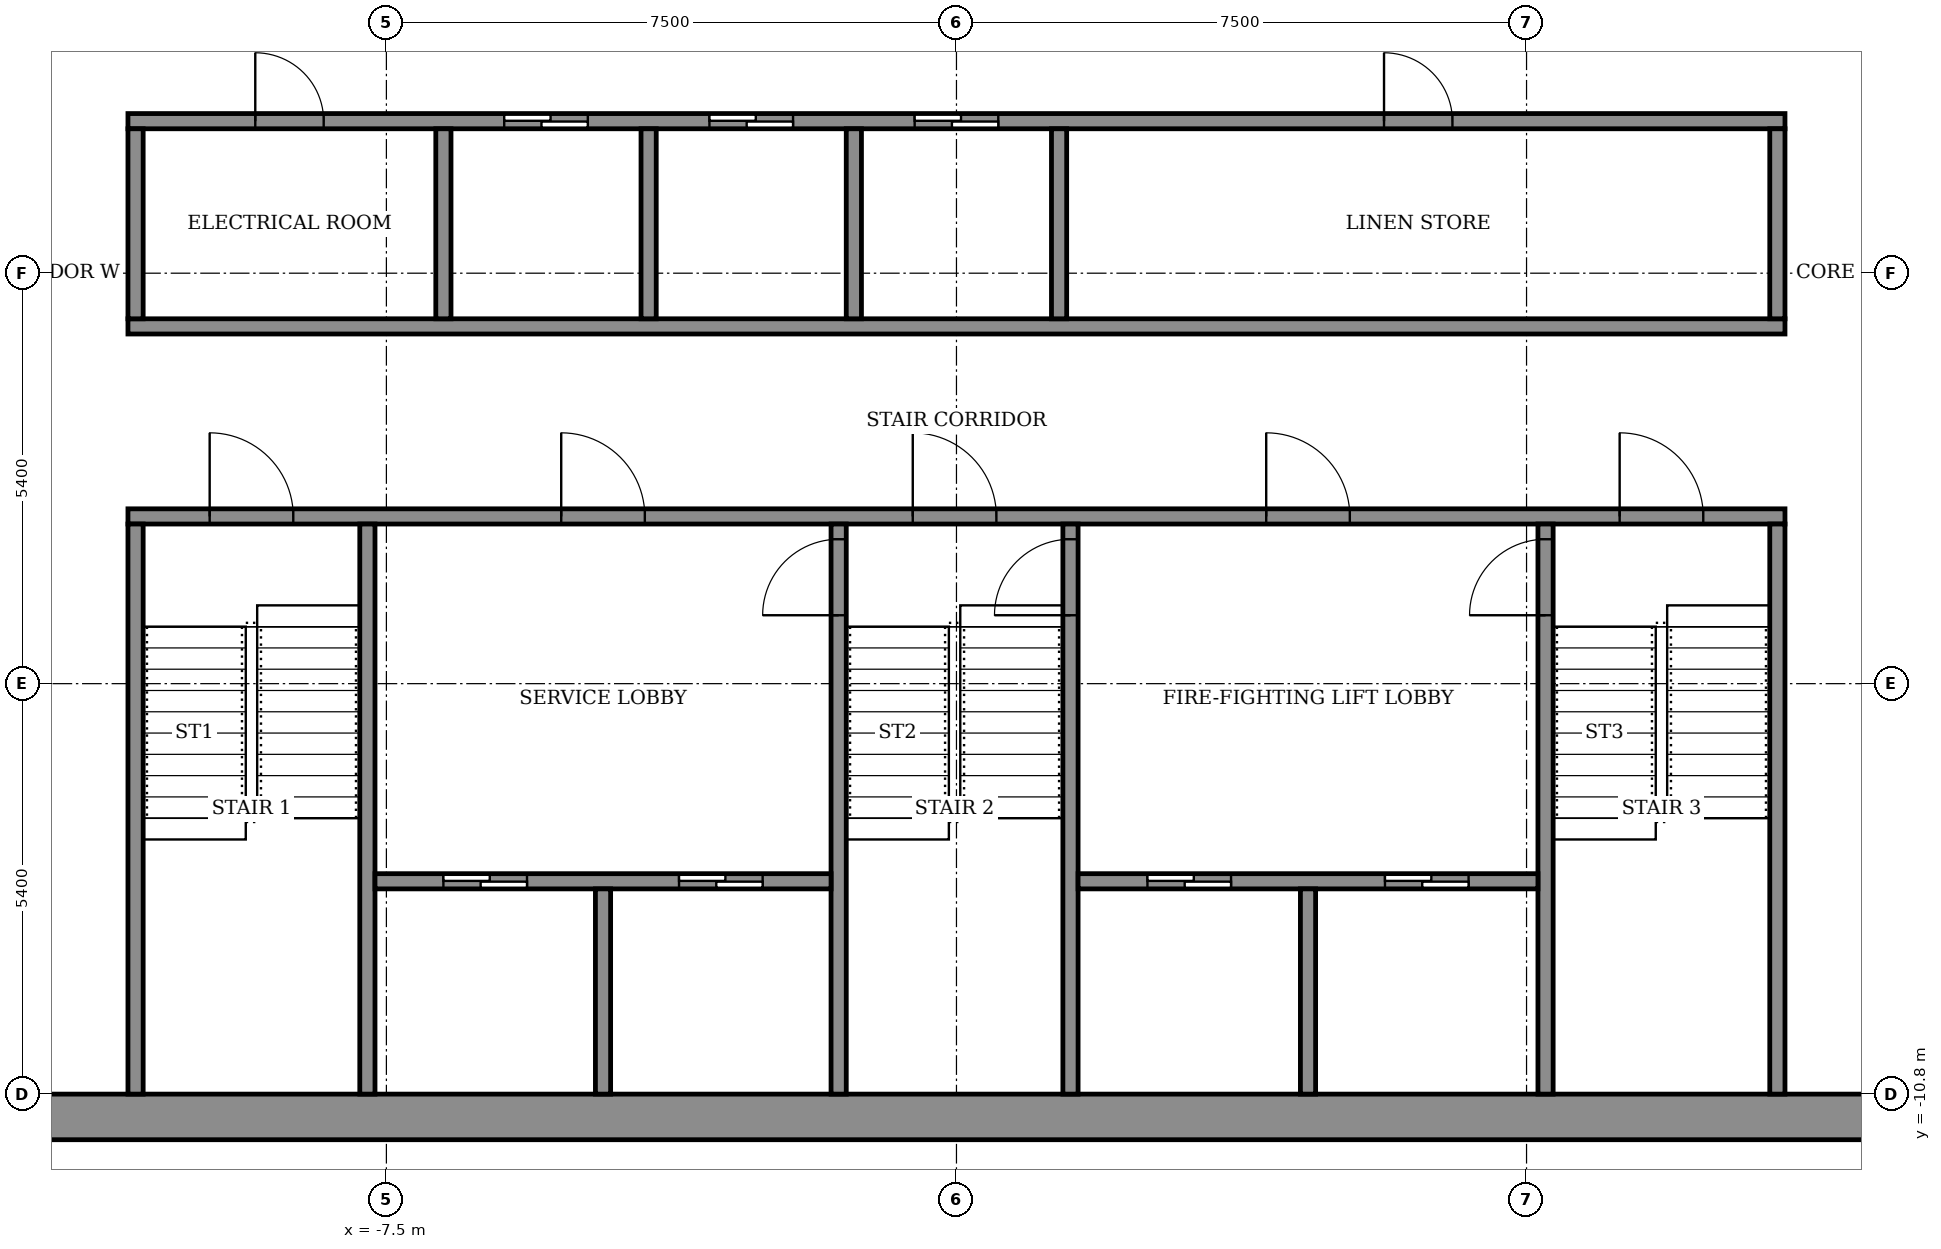
"""IFC4 building model, lengths in metres.
Left out: names, types, materials, properties, quantities, classifications, styles, units other than length and angle.
Written with IfcOpenShell. Run it as: python <this file> out.ifc"""

import sys

from ifc_helpers import new_model, si_unit, direction, frame, frame_2d, origin, place, context, subcontext, project, spatial, rectangle, extrude, element, fill, save


model = new_model("IFC4")
c1 = context("Model", 3, precision=1e-05, world=origin(), true_north=direction((0.0, 1.0)))
c2 = subcontext(c1, "Body", "Model", "MODEL_VIEW")
j1 = project(units=[si_unit("LENGTHUNIT", "METRE"), si_unit("PLANEANGLEUNIT", "RADIAN")], contexts=[c1])
p1 = place(None, origin())
s1 = spatial("IfcSite", under=j1, at=p1, CompositionType="ELEMENT")
p2 = place(p1, origin())
s2 = spatial("IfcBuilding", under=s1, at=p2, CompositionType="ELEMENT")
p3 = place(p2, frame((0.0, 0.0, 342.5)))
s3 = spatial("IfcBuildingStorey", under=s2, at=p3, CompositionType="ELEMENT", Elevation=342.5)
p4 = place(p3, frame((-14.4, -11.1, 0.0), z_axis=(0.0, 0.0, 1.0), x_axis=(1.0, 0.0, 0.0)))
e1 = element("IfcWall", 1, at=p4, inside=s3, PredefinedType="SHEAR", context=c2, shape_type="SweptSolid", body=[
    extrude(rectangle(XDim=28.8, YDim=0.6, at=frame_2d((14.4, 0.0))), origin(), (0.0, 0.0, 1.0), 3.6),
])
p5 = place(p3, frame((-10.9, -3.2, 0.0), z_axis=(0.0, 0.0, 1.0), x_axis=(1.0, 0.0, 0.0)))
e2 = element("IfcWall", 2, at=p5, inside=s3, PredefinedType="SHEAR", context=c2, shape_type="SweptSolid", body=[
    extrude(rectangle(XDim=21.8, YDim=0.2, at=frame_2d((10.9, 0.0))), origin(), (0.0, 0.0, 1.0), 3.05),
])
p6 = place(p5, frame((1.075, 0.0, 0.0)))
e3 = element("IfcOpeningElement", 3, at=p6, cuts=e2, PredefinedType="OPENING", context=c2, shape_type="SweptSolid", body=[
    extrude(rectangle(XDim=1.1, YDim=2.1, at=frame_2d((0.55, 1.05))), frame((0.0, 0.11, 0.0), z_axis=(0.0, -1.0, 0.0), x_axis=(1.0, 0.0, 0.0)), (0.0, 0.0, 1.0), 0.22),
])
p7 = place(p5, frame((10.325, 0.0, 0.0)))
e4 = element("IfcOpeningElement", 4, at=p7, cuts=e2, PredefinedType="OPENING", context=c2, shape_type="SweptSolid", body=[
    extrude(rectangle(XDim=1.1, YDim=2.1, at=frame_2d((0.55, 1.05))), frame((0.0, 0.11, 0.0), z_axis=(0.0, -1.0, 0.0), x_axis=(1.0, 0.0, 0.0)), (0.0, 0.0, 1.0), 0.22),
])
p8 = place(p5, frame((19.625, 0.0, 0.0)))
e5 = element("IfcOpeningElement", 5, at=p8, cuts=e2, PredefinedType="OPENING", context=c2, shape_type="SweptSolid", body=[
    extrude(rectangle(XDim=1.1, YDim=2.1, at=frame_2d((0.55, 1.05))), frame((0.0, 0.11, 0.0), z_axis=(0.0, -1.0, 0.0), x_axis=(1.0, 0.0, 0.0)), (0.0, 0.0, 1.0), 0.22),
])
p9 = place(p5, frame((5.7, 0.0, 0.0)))
e6 = element("IfcOpeningElement", 6, at=p9, cuts=e2, PredefinedType="OPENING", context=c2, shape_type="SweptSolid", body=[
    extrude(rectangle(XDim=1.1, YDim=2.1, at=frame_2d((0.55, 1.05))), frame((0.0, 0.11, 0.0), z_axis=(0.0, -1.0, 0.0), x_axis=(1.0, 0.0, 0.0)), (0.0, 0.0, 1.0), 0.22),
])
p10 = place(p5, frame((14.975, 0.0, 0.0)))
e7 = element("IfcOpeningElement", 7, at=p10, cuts=e2, PredefinedType="OPENING", context=c2, shape_type="SweptSolid", body=[
    extrude(rectangle(XDim=1.1, YDim=2.1, at=frame_2d((0.55, 1.05))), frame((0.0, 0.11, 0.0), z_axis=(0.0, -1.0, 0.0), x_axis=(1.0, 0.0, 0.0)), (0.0, 0.0, 1.0), 0.22),
])
p11 = place(p3, frame((-10.9, -0.7, 0.0), z_axis=(0.0, 0.0, 1.0), x_axis=(1.0, 0.0, 0.0)))
e8 = element("IfcWall", 8, at=p11, inside=s3, PredefinedType="SHEAR", context=c2, shape_type="SweptSolid", body=[
    extrude(rectangle(XDim=21.8, YDim=0.2, at=frame_2d((10.9, 0.0))), origin(), (0.0, 0.0, 1.0), 3.05),
])
p12 = place(p3, frame((-10.9, 2.0, 0.0), z_axis=(0.0, 0.0, 1.0), x_axis=(1.0, 0.0, 0.0)))
e9 = element("IfcWall", 9, at=p12, inside=s3, PredefinedType="SHEAR", context=c2, shape_type="SweptSolid", body=[
    extrude(rectangle(XDim=21.8, YDim=0.2, at=frame_2d((10.9, 0.0))), origin(), (0.0, 0.0, 1.0), 3.05),
])
p13 = place(p12, frame((4.95, 0.0, 0.0)))
e10 = element("IfcOpeningElement", 10, at=p13, cuts=e9, PredefinedType="OPENING", context=c2, shape_type="SweptSolid", body=[
    extrude(rectangle(XDim=1.1, YDim=2.1, at=frame_2d((0.55, 1.05))), frame((0.0, 0.11, 0.0), z_axis=(0.0, -1.0, 0.0), x_axis=(1.0, 0.0, 0.0)), (0.0, 0.0, 1.0), 0.22),
])
p14 = place(p12, frame((7.65, 0.0, 0.0)))
e11 = element("IfcOpeningElement", 11, at=p14, cuts=e9, PredefinedType="OPENING", context=c2, shape_type="SweptSolid", body=[
    extrude(rectangle(XDim=1.1, YDim=2.1, at=frame_2d((0.55, 1.05))), frame((0.0, 0.11, 0.0), z_axis=(0.0, -1.0, 0.0), x_axis=(1.0, 0.0, 0.0)), (0.0, 0.0, 1.0), 0.22),
])
p15 = place(p12, frame((10.35, 0.0, 0.0)))
e12 = element("IfcOpeningElement", 12, at=p15, cuts=e9, PredefinedType="OPENING", context=c2, shape_type="SweptSolid", body=[
    extrude(rectangle(XDim=1.1, YDim=2.1, at=frame_2d((0.55, 1.05))), frame((0.0, 0.11, 0.0), z_axis=(0.0, -1.0, 0.0), x_axis=(1.0, 0.0, 0.0)), (0.0, 0.0, 1.0), 0.22),
])
p16 = place(p12, frame((1.675, 0.0, 0.0)))
e13 = element("IfcOpeningElement", 13, at=p16, cuts=e9, PredefinedType="OPENING", context=c2, shape_type="SweptSolid", body=[
    extrude(rectangle(XDim=0.9, YDim=2.1, at=frame_2d((0.45, 1.05))), frame((0.0, 0.11, 0.0), z_axis=(0.0, -1.0, 0.0), x_axis=(1.0, 0.0, 0.0)), (0.0, 0.0, 1.0), 0.22),
])
p17 = place(p12, frame((16.525, 0.0, 0.0)))
e14 = element("IfcOpeningElement", 14, at=p17, cuts=e9, PredefinedType="OPENING", context=c2, shape_type="SweptSolid", body=[
    extrude(rectangle(XDim=0.9, YDim=2.1, at=frame_2d((0.45, 1.05))), frame((0.0, 0.11, 0.0), z_axis=(0.0, -1.0, 0.0), x_axis=(1.0, 0.0, 0.0)), (0.0, 0.0, 1.0), 0.22),
])
for number, where, z_axis, x_axis in (
    (15, (-10.8, -10.8, 0.0), (0.0, 0.0, 1.0), (0.0, 1.0, 0.0)),
    (16, (-7.75, -10.8, 0.0), (0.0, 0.0, 1.0), (0.0, 1.0, 0.0)),
):
    element("IfcWall", number, at=place(p3, frame(where, z_axis=z_axis, x_axis=x_axis)), inside=s3, PredefinedType="SHEAR", context=c2, shape_type="SweptSolid", body=[
        extrude(rectangle(XDim=7.5, YDim=0.2, at=frame_2d((3.75, 0.0))), origin(), (0.0, 0.0, 1.0), 3.05),
    ])
p18 = place(p3, frame((-1.55, -10.8, 0.0), z_axis=(0.0, 0.0, 1.0), x_axis=(0.0, 1.0, 0.0)))
e17 = element("IfcWall", 17, at=p18, inside=s3, PredefinedType="SHEAR", context=c2, shape_type="SweptSolid", body=[
    extrude(rectangle(XDim=7.5, YDim=0.2, at=frame_2d((3.75, 0.0))), origin(), (0.0, 0.0, 1.0), 3.05),
])
p19 = place(p18, frame((6.3, 0.0, 0.0)))
e18 = element("IfcOpeningElement", 18, at=p19, cuts=e17, PredefinedType="OPENING", context=c2, shape_type="SweptSolid", body=[
    extrude(rectangle(XDim=1.0, YDim=2.1, at=frame_2d((0.5, 1.05))), frame((0.0, 0.11, 0.0), z_axis=(0.0, -1.0, 0.0), x_axis=(1.0, 0.0, 0.0)), (0.0, 0.0, 1.0), 0.22),
])
p20 = place(p3, frame((1.5, -10.8, 0.0), z_axis=(0.0, 0.0, 1.0), x_axis=(0.0, 1.0, 0.0)))
e19 = element("IfcWall", 19, at=p20, inside=s3, PredefinedType="SHEAR", context=c2, shape_type="SweptSolid", body=[
    extrude(rectangle(XDim=7.5, YDim=0.2, at=frame_2d((3.75, 0.0))), origin(), (0.0, 0.0, 1.0), 3.05),
])
p21 = place(p20, frame((6.3, 0.0, 0.0)))
e20 = element("IfcOpeningElement", 20, at=p21, cuts=e19, PredefinedType="OPENING", context=c2, shape_type="SweptSolid", body=[
    extrude(rectangle(XDim=1.0, YDim=2.1, at=frame_2d((0.5, 1.05))), frame((0.0, 0.11, 0.0), z_axis=(0.0, -1.0, 0.0), x_axis=(1.0, 0.0, 0.0)), (0.0, 0.0, 1.0), 0.22),
])
p22 = place(p3, frame((7.75, -10.8, 0.0), z_axis=(0.0, 0.0, 1.0), x_axis=(0.0, 1.0, 0.0)))
e21 = element("IfcWall", 21, at=p22, inside=s3, PredefinedType="SHEAR", context=c2, shape_type="SweptSolid", body=[
    extrude(rectangle(XDim=7.5, YDim=0.2, at=frame_2d((3.75, 0.0))), origin(), (0.0, 0.0, 1.0), 3.05),
])
p23 = place(p22, frame((6.3, 0.0, 0.0)))
e22 = element("IfcOpeningElement", 22, at=p23, cuts=e21, PredefinedType="OPENING", context=c2, shape_type="SweptSolid", body=[
    extrude(rectangle(XDim=1.0, YDim=2.1, at=frame_2d((0.5, 1.05))), frame((0.0, 0.11, 0.0), z_axis=(0.0, -1.0, 0.0), x_axis=(1.0, 0.0, 0.0)), (0.0, 0.0, 1.0), 0.22),
])
p24 = place(p3, frame((10.8, -10.8, 0.0), z_axis=(0.0, 0.0, 1.0), x_axis=(0.0, 1.0, 0.0)))
e23 = element("IfcWall", 23, at=p24, inside=s3, PredefinedType="SHEAR", context=c2, shape_type="SweptSolid", body=[
    extrude(rectangle(XDim=7.5, YDim=0.2, at=frame_2d((3.75, 0.0))), origin(), (0.0, 0.0, 1.0), 3.05),
])
p25 = place(p3, frame((-7.65, -8.0, 0.0), z_axis=(0.0, 0.0, 1.0), x_axis=(1.0, 0.0, 0.0)))
e24 = element("IfcWall", 24, at=p25, inside=s3, PredefinedType="SHEAR", context=c2, shape_type="SweptSolid", body=[
    extrude(rectangle(XDim=6.0, YDim=0.2, at=frame_2d((3.0, 0.0))), origin(), (0.0, 0.0, 1.0), 3.05),
])
p26 = place(p25, frame((0.9, 0.0, 0.0)))
e25 = element("IfcOpeningElement", 25, at=p26, cuts=e24, PredefinedType="OPENING", context=c2, shape_type="SweptSolid", body=[
    extrude(rectangle(XDim=1.1, YDim=2.1, at=frame_2d((0.55, 1.05))), frame((0.0, 0.11, 0.0), z_axis=(0.0, -1.0, 0.0), x_axis=(1.0, 0.0, 0.0)), (0.0, 0.0, 1.0), 0.22),
])
p27 = place(p25, frame((4.0, 0.0, 0.0)))
e26 = element("IfcOpeningElement", 26, at=p27, cuts=e24, PredefinedType="OPENING", context=c2, shape_type="SweptSolid", body=[
    extrude(rectangle(XDim=1.1, YDim=2.1, at=frame_2d((0.55, 1.05))), frame((0.0, 0.11, 0.0), z_axis=(0.0, -1.0, 0.0), x_axis=(1.0, 0.0, 0.0)), (0.0, 0.0, 1.0), 0.22),
])
p28 = place(p3, frame((-4.65, -10.8, 0.0), z_axis=(0.0, 0.0, 1.0), x_axis=(0.0, 1.0, 0.0)))
e27 = element("IfcWall", 27, at=p28, inside=s3, PredefinedType="SHEAR", context=c2, shape_type="SweptSolid", body=[
    extrude(rectangle(XDim=2.7, YDim=0.2, at=frame_2d((1.35, 0.0))), origin(), (0.0, 0.0, 1.0), 3.05),
])
p29 = place(p3, frame((1.6, -8.0, 0.0), z_axis=(0.0, 0.0, 1.0), x_axis=(1.0, 0.0, 0.0)))
e28 = element("IfcWall", 28, at=p29, inside=s3, PredefinedType="SHEAR", context=c2, shape_type="SweptSolid", body=[
    extrude(rectangle(XDim=6.05, YDim=0.2, at=frame_2d((3.025, 0.0))), origin(), (0.0, 0.0, 1.0), 3.05),
])
p30 = place(p29, frame((0.913, 0.0, 0.0)))
e29 = element("IfcOpeningElement", 29, at=p30, cuts=e28, PredefinedType="OPENING", context=c2, shape_type="SweptSolid", body=[
    extrude(rectangle(XDim=1.1, YDim=2.1, at=frame_2d((0.55, 1.05))), frame((0.0, 0.11, 0.0), z_axis=(0.0, -1.0, 0.0), x_axis=(1.0, 0.0, 0.0)), (0.0, 0.0, 1.0), 0.22),
])
p31 = place(p29, frame((4.038, 0.0, 0.0)))
e30 = element("IfcOpeningElement", 30, at=p31, cuts=e28, PredefinedType="OPENING", context=c2, shape_type="SweptSolid", body=[
    extrude(rectangle(XDim=1.1, YDim=2.1, at=frame_2d((0.55, 1.05))), frame((0.0, 0.11, 0.0), z_axis=(0.0, -1.0, 0.0), x_axis=(1.0, 0.0, 0.0)), (0.0, 0.0, 1.0), 0.22),
])
p32 = place(p3, frame((4.625, -10.8, 0.0), z_axis=(0.0, 0.0, 1.0), x_axis=(0.0, 1.0, 0.0)))
e31 = element("IfcWall", 31, at=p32, inside=s3, PredefinedType="SHEAR", context=c2, shape_type="SweptSolid", body=[
    extrude(rectangle(XDim=2.7, YDim=0.2, at=frame_2d((1.35, 0.0))), origin(), (0.0, 0.0, 1.0), 3.05),
])
p33 = place(p3, frame((-10.8, -0.6, 0.0), z_axis=(0.0, 0.0, 1.0), x_axis=(0.0, 1.0, 0.0)))
e32 = element("IfcWall", 32, at=p33, inside=s3, PredefinedType="STANDARD", context=c2, shape_type="SweptSolid", body=[
    extrude(rectangle(XDim=2.5, YDim=0.2, at=frame_2d((1.25, 0.0))), origin(), (0.0, 0.0, 1.0), 3.05),
])
for number, where, z_axis, x_axis in (
    (33, (-6.75, -0.6, 0.0), (0.0, 0.0, 1.0), (0.0, 1.0, 0.0)),
    (34, (-4.05, -0.6, 0.0), (0.0, 0.0, 1.0), (0.0, 1.0, 0.0)),
    (35, (-1.35, -0.6, 0.0), (0.0, 0.0, 1.0), (0.0, 1.0, 0.0)),
    (36, (1.35, -0.6, 0.0), (0.0, 0.0, 1.0), (0.0, 1.0, 0.0)),
):
    element("IfcWall", number, at=place(p3, frame(where, z_axis=z_axis, x_axis=x_axis)), inside=s3, PredefinedType="SHEAR", context=c2, shape_type="SweptSolid", body=[
        extrude(rectangle(XDim=2.5, YDim=0.2, at=frame_2d((1.25, 0.0))), origin(), (0.0, 0.0, 1.0), 3.05),
    ])
p34 = place(p3, frame((10.8, -0.6, 0.0), z_axis=(0.0, 0.0, 1.0), x_axis=(0.0, 1.0, 0.0)))
e37 = element("IfcWall", 37, at=p34, inside=s3, PredefinedType="STANDARD", context=c2, shape_type="SweptSolid", body=[
    extrude(rectangle(XDim=2.5, YDim=0.2, at=frame_2d((1.25, 0.0))), origin(), (0.0, 0.0, 1.0), 3.05),
])
p35 = place(p13, origin())
e38 = element("IfcDoor", 38, at=p35, inside=s3, OperationType="SLIDING_TO_LEFT", PredefinedType="DOOR", context=c2, shape_type="SweptSolid", body=[
    extrude(rectangle(XDim=1.1, YDim=2.1, at=frame_2d((0.55, 1.05))), frame((0.0, 0.025, 0.0), z_axis=(0.0, -1.0, 0.0), x_axis=(1.0, 0.0, 0.0)), (0.0, 0.0, 1.0), 0.05),
])
fill(e10, e38)
p36 = place(p14, origin())
e39 = element("IfcDoor", 39, at=p36, inside=s3, OperationType="SLIDING_TO_LEFT", PredefinedType="DOOR", context=c2, shape_type="SweptSolid", body=[
    extrude(rectangle(XDim=1.1, YDim=2.1, at=frame_2d((0.55, 1.05))), frame((0.0, 0.025, 0.0), z_axis=(0.0, -1.0, 0.0), x_axis=(1.0, 0.0, 0.0)), (0.0, 0.0, 1.0), 0.05),
])
fill(e11, e39)
p37 = place(p15, origin())
e40 = element("IfcDoor", 40, at=p37, inside=s3, OperationType="SLIDING_TO_LEFT", PredefinedType="DOOR", context=c2, shape_type="SweptSolid", body=[
    extrude(rectangle(XDim=1.1, YDim=2.1, at=frame_2d((0.55, 1.05))), frame((0.0, 0.025, 0.0), z_axis=(0.0, -1.0, 0.0), x_axis=(1.0, 0.0, 0.0)), (0.0, 0.0, 1.0), 0.05),
])
fill(e12, e40)
p38 = place(p16, origin())
e41 = element("IfcDoor", 41, at=p38, inside=s3, OperationType="SINGLE_SWING_LEFT", PredefinedType="DOOR", context=c2, shape_type="SweptSolid", body=[
    extrude(rectangle(XDim=0.9, YDim=2.1, at=frame_2d((0.45, 1.05))), frame((0.0, 0.025, 0.0), z_axis=(0.0, -1.0, 0.0), x_axis=(1.0, 0.0, 0.0)), (0.0, 0.0, 1.0), 0.05),
])
fill(e13, e41)
p39 = place(p17, origin())
e42 = element("IfcDoor", 42, at=p39, inside=s3, OperationType="SINGLE_SWING_RIGHT", PredefinedType="DOOR", context=c2, shape_type="SweptSolid", body=[
    extrude(rectangle(XDim=0.9, YDim=2.1, at=frame_2d((0.45, 1.05))), frame((0.0, 0.025, 0.0), z_axis=(0.0, -1.0, 0.0), x_axis=(1.0, 0.0, 0.0)), (0.0, 0.0, 1.0), 0.05),
])
fill(e14, e42)
p40 = place(p30, origin())
e43 = element("IfcDoor", 43, at=p40, inside=s3, OperationType="SLIDING_TO_LEFT", PredefinedType="DOOR", context=c2, shape_type="SweptSolid", body=[
    extrude(rectangle(XDim=1.1, YDim=2.1, at=frame_2d((0.55, 1.05))), frame((0.0, 0.025, 0.0), z_axis=(0.0, -1.0, 0.0), x_axis=(1.0, 0.0, 0.0)), (0.0, 0.0, 1.0), 0.05),
])
fill(e29, e43)
p41 = place(p26, origin())
e44 = element("IfcDoor", 44, at=p41, inside=s3, OperationType="SLIDING_TO_LEFT", PredefinedType="DOOR", context=c2, shape_type="SweptSolid", body=[
    extrude(rectangle(XDim=1.1, YDim=2.1, at=frame_2d((0.55, 1.05))), frame((0.0, 0.025, 0.0), z_axis=(0.0, -1.0, 0.0), x_axis=(1.0, 0.0, 0.0)), (0.0, 0.0, 1.0), 0.05),
])
fill(e25, e44)
p42 = place(p31, origin())
e45 = element("IfcDoor", 45, at=p42, inside=s3, OperationType="SLIDING_TO_LEFT", PredefinedType="DOOR", context=c2, shape_type="SweptSolid", body=[
    extrude(rectangle(XDim=1.1, YDim=2.1, at=frame_2d((0.55, 1.05))), frame((0.0, 0.025, 0.0), z_axis=(0.0, -1.0, 0.0), x_axis=(1.0, 0.0, 0.0)), (0.0, 0.0, 1.0), 0.05),
])
fill(e30, e45)
p43 = place(p27, origin())
e46 = element("IfcDoor", 46, at=p43, inside=s3, OperationType="SLIDING_TO_LEFT", PredefinedType="DOOR", context=c2, shape_type="SweptSolid", body=[
    extrude(rectangle(XDim=1.1, YDim=2.1, at=frame_2d((0.55, 1.05))), frame((0.0, 0.025, 0.0), z_axis=(0.0, -1.0, 0.0), x_axis=(1.0, 0.0, 0.0)), (0.0, 0.0, 1.0), 0.05),
])
fill(e26, e46)
p44 = place(p6, origin())
e47 = element("IfcDoor", 47, at=p44, inside=s3, OperationType="SINGLE_SWING_RIGHT", PredefinedType="DOOR", context=c2, shape_type="SweptSolid", body=[
    extrude(rectangle(XDim=1.1, YDim=2.1, at=frame_2d((0.55, 1.05))), frame((0.0, 0.025, 0.0), z_axis=(0.0, -1.0, 0.0), x_axis=(1.0, 0.0, 0.0)), (0.0, 0.0, 1.0), 0.05),
])
fill(e3, e47)
p45 = place(p7, origin())
e48 = element("IfcDoor", 48, at=p45, inside=s3, OperationType="SINGLE_SWING_RIGHT", PredefinedType="DOOR", context=c2, shape_type="SweptSolid", body=[
    extrude(rectangle(XDim=1.1, YDim=2.1, at=frame_2d((0.55, 1.05))), frame((0.0, 0.025, 0.0), z_axis=(0.0, -1.0, 0.0), x_axis=(1.0, 0.0, 0.0)), (0.0, 0.0, 1.0), 0.05),
])
fill(e4, e48)
p46 = place(p8, origin())
e49 = element("IfcDoor", 49, at=p46, inside=s3, OperationType="SINGLE_SWING_RIGHT", PredefinedType="DOOR", context=c2, shape_type="SweptSolid", body=[
    extrude(rectangle(XDim=1.1, YDim=2.1, at=frame_2d((0.55, 1.05))), frame((0.0, 0.025, 0.0), z_axis=(0.0, -1.0, 0.0), x_axis=(1.0, 0.0, 0.0)), (0.0, 0.0, 1.0), 0.05),
])
fill(e5, e49)
p47 = place(p9, origin())
e50 = element("IfcDoor", 50, at=p47, inside=s3, OperationType="SINGLE_SWING_LEFT", PredefinedType="DOOR", context=c2, shape_type="SweptSolid", body=[
    extrude(rectangle(XDim=1.1, YDim=2.1, at=frame_2d((0.55, 1.05))), frame((0.0, 0.025, 0.0), z_axis=(0.0, -1.0, 0.0), x_axis=(1.0, 0.0, 0.0)), (0.0, 0.0, 1.0), 0.05),
])
fill(e6, e50)
p48 = place(p10, origin())
e51 = element("IfcDoor", 51, at=p48, inside=s3, OperationType="SINGLE_SWING_LEFT", PredefinedType="DOOR", context=c2, shape_type="SweptSolid", body=[
    extrude(rectangle(XDim=1.1, YDim=2.1, at=frame_2d((0.55, 1.05))), frame((0.0, 0.025, 0.0), z_axis=(0.0, -1.0, 0.0), x_axis=(1.0, 0.0, 0.0)), (0.0, 0.0, 1.0), 0.05),
])
fill(e7, e51)
p49 = place(p19, origin())
e52 = element("IfcDoor", 52, at=p49, inside=s3, OperationType="SINGLE_SWING_RIGHT", PredefinedType="DOOR", context=c2, shape_type="SweptSolid", body=[
    extrude(rectangle(XDim=1.0, YDim=2.1, at=frame_2d((0.5, 1.05))), frame((0.0, 0.025, 0.0), z_axis=(0.0, -1.0, 0.0), x_axis=(1.0, 0.0, 0.0)), (0.0, 0.0, 1.0), 0.05),
])
fill(e18, e52)
p50 = place(p21, origin())
e53 = element("IfcDoor", 53, at=p50, inside=s3, OperationType="SINGLE_SWING_RIGHT", PredefinedType="DOOR", context=c2, shape_type="SweptSolid", body=[
    extrude(rectangle(XDim=1.0, YDim=2.1, at=frame_2d((0.5, 1.05))), frame((0.0, 0.025, 0.0), z_axis=(0.0, -1.0, 0.0), x_axis=(1.0, 0.0, 0.0)), (0.0, 0.0, 1.0), 0.05),
])
fill(e20, e53)
p51 = place(p23, origin())
e54 = element("IfcDoor", 54, at=p51, inside=s3, OperationType="SINGLE_SWING_RIGHT", PredefinedType="DOOR", context=c2, shape_type="SweptSolid", body=[
    extrude(rectangle(XDim=1.0, YDim=2.1, at=frame_2d((0.5, 1.05))), frame((0.0, 0.025, 0.0), z_axis=(0.0, -1.0, 0.0), x_axis=(1.0, 0.0, 0.0)), (0.0, 0.0, 1.0), 0.05),
])
fill(e22, e54)
save(model, sys.argv[1])
